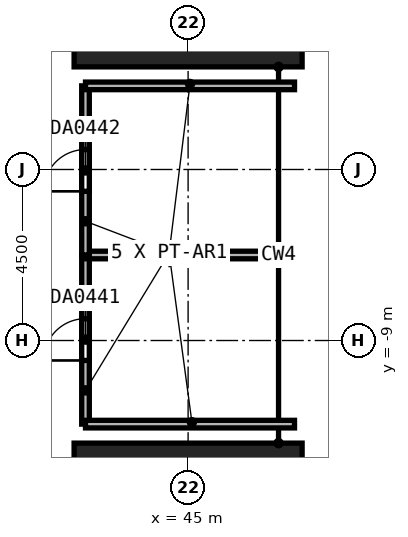
"""IFC4 building model, lengths in metres.
Left out: names, types, materials, properties, quantities, classifications, styles, units other than length and angle.
Written with IfcOpenShell. Run it as: python <this file> out.ifc"""

import sys

from ifc_helpers import new_model, si_unit, direction, frame, frame_2d, origin, origin_2d, place, context, subcontext, project, spatial, rectangle, extrude, element, fill, save


model = new_model("IFC4")
c1 = context("Model", 3, precision=1e-05, world=origin(), true_north=direction((0.0, 1.0)))
c2 = subcontext(c1, "Body", "Model", "MODEL_VIEW")
j1 = project(units=[si_unit("LENGTHUNIT", "METRE"), si_unit("PLANEANGLEUNIT", "RADIAN")], contexts=[c1])
p1 = place(None, origin())
s1 = spatial("IfcSite", under=j1, at=p1, CompositionType="ELEMENT")
p2 = place(p1, origin())
s2 = spatial("IfcBuilding", under=s1, at=p2, CompositionType="ELEMENT")
p3 = place(p2, frame((0.0, 0.0, 37.0)))
s3 = spatial("IfcBuildingStorey", under=s2, at=p3, CompositionType="ELEMENT", Elevation=37.0)
for number, where, z_axis, x_axis in (
    (1, (45.0, -13.5, 0.0), (0.0, 0.0, 1.0), (0.0, 1.0, 0.0)),
    (2, (45.0, 0.0, 0.0), (0.0, 0.0, 1.0), (0.0, 1.0, 0.0)),
):
    element("IfcColumn", number, at=place(p3, frame(where, z_axis=z_axis, x_axis=x_axis)), inside=s3, PredefinedType="COLUMN", context=c2, shape_type="SweptSolid", body=[
        extrude(rectangle(XDim=3.6, YDim=6.0, at=origin_2d()), origin(), (0.0, 0.0, 1.0), 5.8),
    ])
p4 = place(p3, frame((42.3, -11.2, 0.0), z_axis=(0.0, 0.0, 1.0), x_axis=(0.0, 1.0, 0.0)))
e3 = element("IfcWall", 3, at=p4, inside=s3, PredefinedType="PARTITIONING", context=c2, shape_type="SweptSolid", body=[
    extrude(rectangle(XDim=4.45, YDim=0.2, at=frame_2d((2.225, 0.0))), origin(), (0.0, 0.0, 1.0), 6.7),
])
p5 = place(p4, frame((1.675, 0.0, 0.0)))
e4 = element("IfcOpeningElement", 4, at=p5, cuts=e3, PredefinedType="OPENING", context=c2, shape_type="SweptSolid", body=[
    extrude(rectangle(XDim=1.1, YDim=2.4, at=frame_2d((0.55, 1.2))), frame((0.0, 0.1, 0.0), z_axis=(0.0, -1.0, 0.0), x_axis=(1.0, 0.0, 0.0)), (0.0, 0.0, 1.0), 0.2),
])
for number, where, z_axis, x_axis in (
    (5, (42.3, -11.2, 0.0), (0.0, 0.0, 1.0), (1.0, 0.0, 0.0)),
    (6, (42.3, -6.75, 0.0), (0.0, 0.0, 1.0), (1.0, 0.0, 0.0)),
):
    element("IfcWall", number, at=place(p3, frame(where, z_axis=z_axis, x_axis=x_axis)), inside=s3, PredefinedType="PARTITIONING", context=c2, shape_type="SweptSolid", body=[
        extrude(rectangle(XDim=5.5, YDim=0.2, at=frame_2d((2.75, 0.0))), origin(), (0.0, 0.0, 1.0), 6.7),
    ])
p6 = place(p3, frame((42.3, -6.75, 0.0), z_axis=(0.0, 0.0, 1.0), x_axis=(0.0, 1.0, 0.0)))
e7 = element("IfcWall", 7, at=p6, inside=s3, PredefinedType="PARTITIONING", context=c2, shape_type="SweptSolid", body=[
    extrude(rectangle(XDim=4.45, YDim=0.2, at=frame_2d((2.225, 0.0))), origin(), (0.0, 0.0, 1.0), 6.7),
])
p7 = place(p6, frame((1.675, 0.0, 0.0)))
e8 = element("IfcOpeningElement", 8, at=p7, cuts=e7, PredefinedType="OPENING", context=c2, shape_type="SweptSolid", body=[
    extrude(rectangle(XDim=1.1, YDim=2.4, at=frame_2d((0.55, 1.2))), frame((0.0, 0.1, 0.0), z_axis=(0.0, -1.0, 0.0), x_axis=(1.0, 0.0, 0.0)), (0.0, 0.0, 1.0), 0.2),
])
p8 = place(p3, frame((42.3, -2.3, 0.0), z_axis=(0.0, 0.0, 1.0), x_axis=(1.0, 0.0, 0.0)))
e9 = element("IfcWall", 9, at=p8, inside=s3, PredefinedType="PARTITIONING", context=c2, shape_type="SweptSolid", body=[
    extrude(rectangle(XDim=5.5, YDim=0.2, at=frame_2d((2.75, 0.0))), origin(), (0.0, 0.0, 1.0), 6.7),
])
p9 = place(p5, origin())
e10 = element("IfcDoor", 10, at=p9, inside=s3, OperationType="DOUBLE_DOOR_SINGLE_SWING", PredefinedType="DOOR", context=c2, shape_type="SweptSolid", body=[
    extrude(rectangle(XDim=1.1, YDim=2.4, at=frame_2d((0.55, 1.2))), frame((0.0, 0.025, 0.0), z_axis=(0.0, -1.0, 0.0), x_axis=(1.0, 0.0, 0.0)), (0.0, 0.0, 1.0), 0.05),
])
fill(e4, e10)
p10 = place(p7, origin())
e11 = element("IfcDoor", 11, at=p10, inside=s3, OperationType="DOUBLE_DOOR_SINGLE_SWING", PredefinedType="DOOR", context=c2, shape_type="SweptSolid", body=[
    extrude(rectangle(XDim=1.1, YDim=2.4, at=frame_2d((0.55, 1.2))), frame((0.0, 0.025, 0.0), z_axis=(0.0, -1.0, 0.0), x_axis=(1.0, 0.0, 0.0)), (0.0, 0.0, 1.0), 0.05),
])
fill(e8, e11)
save(model, sys.argv[1])
